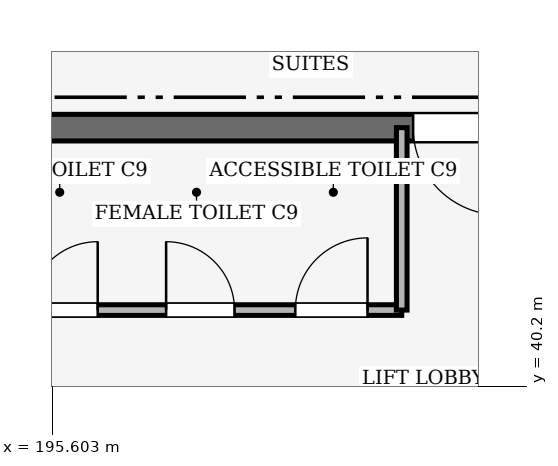
"""IFC4 building model, lengths in metres.
Left out: names, types, materials, properties, quantities, classifications, styles, units other than length and angle.
Written with IfcOpenShell. Run it as: python <this file> out.ifc"""

import sys

from ifc_helpers import new_model, si_unit, direction, frame, frame_2d, origin, place, context, subcontext, project, spatial, rectangle, extrude, element, fill, save


model = new_model("IFC4")
c1 = context("Model", 3, precision=1e-05, world=origin(), true_north=direction((0.0, 1.0)))
c2 = subcontext(c1, "Body", "Model", "MODEL_VIEW")
j1 = project(units=[si_unit("LENGTHUNIT", "METRE"), si_unit("PLANEANGLEUNIT", "RADIAN")], contexts=[c1])
p1 = place(None, origin())
s1 = spatial("IfcSite", under=j1, at=p1, CompositionType="ELEMENT")
p2 = place(p1, origin())
s2 = spatial("IfcBuilding", under=s1, at=p2, CompositionType="ELEMENT")
p3 = place(p2, frame((0.0, 0.0, 5.4)))
s3 = spatial("IfcBuildingStorey", under=s2, at=p3, CompositionType="ELEMENT", Elevation=5.4)
p4 = place(p3, frame((202.6, 43.6, 0.0), z_axis=(0.0, 0.0, 1.0), x_axis=(-1.0, 0.0, 0.0)))
e1 = element("IfcWall", 1, at=p4, inside=s3, PredefinedType="SHEAR", context=c2, shape_type="SweptSolid", body=[
    extrude(rectangle(XDim=7.8, YDim=0.35, at=frame_2d((3.9, 0.0))), origin(), (0.0, 0.0, 1.0), 5.4),
])
p5 = place(p4, frame((1.1, 0.0, 0.0)))
e2 = element("IfcOpeningElement", 2, at=p5, cuts=e1, PredefinedType="OPENING", context=c2, shape_type="SweptSolid", body=[
    extrude(rectangle(XDim=1.15, YDim=2.15, at=frame_2d((0.575, 1.075))), frame((0.0, 0.185, 0.0), z_axis=(0.0, -1.0, 0.0), x_axis=(1.0, 0.0, 0.0)), (0.0, 0.0, 1.0), 0.37),
])
p6 = place(p3, frame((194.8, 41.2, 0.0), z_axis=(0.0, 0.0, 1.0), x_axis=(1.0, 0.0, 0.0)))
e3 = element("IfcWall", 3, at=p6, inside=s3, PredefinedType="PARTITIONING", context=c2, shape_type="SweptSolid", body=[
    extrude(rectangle(XDim=5.4, YDim=0.14, at=frame_2d((2.7, 0.0))), origin(), (0.0, 0.0, 1.0), 4.5),
])
p7 = place(p6, frame((0.5, 0.0, 0.0)))
e4 = element("IfcOpeningElement", 4, at=p7, cuts=e3, PredefinedType="OPENING", context=c2, shape_type="SweptSolid", body=[
    extrude(rectangle(XDim=0.9, YDim=2.1, at=frame_2d((0.45, 1.05))), frame((0.0, 0.08, 0.0), z_axis=(0.0, -1.0, 0.0), x_axis=(1.0, 0.0, 0.0)), (0.0, 0.0, 1.0), 0.16),
])
p8 = place(p6, frame((2.3, 0.0, 0.0)))
e5 = element("IfcOpeningElement", 5, at=p8, cuts=e3, PredefinedType="OPENING", context=c2, shape_type="SweptSolid", body=[
    extrude(rectangle(XDim=0.9, YDim=2.1, at=frame_2d((0.45, 1.05))), frame((0.0, 0.08, 0.0), z_axis=(0.0, -1.0, 0.0), x_axis=(1.0, 0.0, 0.0)), (0.0, 0.0, 1.0), 0.16),
])
p9 = place(p6, frame((4.0, 0.0, 0.0)))
e6 = element("IfcOpeningElement", 6, at=p9, cuts=e3, PredefinedType="OPENING", context=c2, shape_type="SweptSolid", body=[
    extrude(rectangle(XDim=0.95, YDim=2.1, at=frame_2d((0.475, 1.05))), frame((0.0, 0.08, 0.0), z_axis=(0.0, -1.0, 0.0), x_axis=(1.0, 0.0, 0.0)), (0.0, 0.0, 1.0), 0.16),
])
p10 = place(p3, frame((200.2, 41.2, 0.0), z_axis=(0.0, 0.0, 1.0), x_axis=(0.0, 1.0, 0.0)))
e7 = element("IfcWall", 7, at=p10, inside=s3, PredefinedType="PARTITIONING", context=c2, shape_type="SweptSolid", body=[
    extrude(rectangle(XDim=2.4, YDim=0.14, at=frame_2d((1.2, 0.0))), origin(), (0.0, 0.0, 1.0), 4.5),
])
p11 = place(p5, origin())
e8 = element("IfcDoor", 8, at=p11, inside=s3, OperationType="SINGLE_SWING_LEFT", PredefinedType="DOOR", context=c2, shape_type="SweptSolid", body=[
    extrude(rectangle(XDim=1.15, YDim=2.15, at=frame_2d((0.575, 1.075))), frame((0.0, 0.025, 0.0), z_axis=(0.0, -1.0, 0.0), x_axis=(1.0, 0.0, 0.0)), (0.0, 0.0, 1.0), 0.05),
])
fill(e2, e8)
p12 = place(p7, origin())
e9 = element("IfcDoor", 9, at=p12, inside=s3, OperationType="SINGLE_SWING_RIGHT", PredefinedType="DOOR", context=c2, shape_type="SweptSolid", body=[
    extrude(rectangle(XDim=0.9, YDim=2.1, at=frame_2d((0.45, 1.05))), frame((0.0, 0.025, 0.0), z_axis=(0.0, -1.0, 0.0), x_axis=(1.0, 0.0, 0.0)), (0.0, 0.0, 1.0), 0.05),
])
fill(e4, e9)
p13 = place(p8, origin())
e10 = element("IfcDoor", 10, at=p13, inside=s3, OperationType="SINGLE_SWING_LEFT", PredefinedType="DOOR", context=c2, shape_type="SweptSolid", body=[
    extrude(rectangle(XDim=0.9, YDim=2.1, at=frame_2d((0.45, 1.05))), frame((0.0, 0.025, 0.0), z_axis=(0.0, -1.0, 0.0), x_axis=(1.0, 0.0, 0.0)), (0.0, 0.0, 1.0), 0.05),
])
fill(e5, e10)
p14 = place(p9, origin())
e11 = element("IfcDoor", 11, at=p14, inside=s3, OperationType="SINGLE_SWING_RIGHT", PredefinedType="DOOR", context=c2, shape_type="SweptSolid", body=[
    extrude(rectangle(XDim=0.95, YDim=2.1, at=frame_2d((0.475, 1.05))), frame((0.0, 0.025, 0.0), z_axis=(0.0, -1.0, 0.0), x_axis=(1.0, 0.0, 0.0)), (0.0, 0.0, 1.0), 0.05),
])
fill(e6, e11)
save(model, sys.argv[1])
